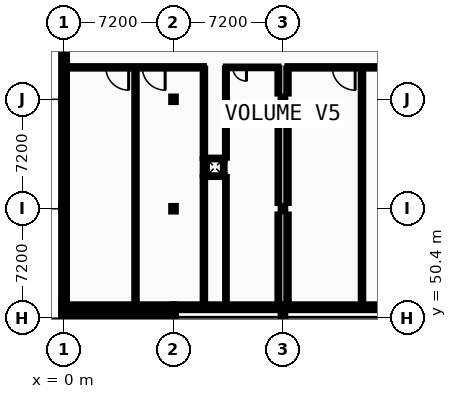
"""IFC4 building model, lengths in metres.
Left out: names, types, materials, properties, quantities, classifications, styles, units other than length and angle.
Written with IfcOpenShell. Run it as: python <this file> out.ifc"""

import sys

from ifc_helpers import new_model, si_unit, direction, frame, frame_2d, origin, origin_2d, place, context, subcontext, project, spatial, rectangle, i_section, extrude, element, fill, save


model = new_model("IFC4")
c1 = context("Model", 3, precision=1e-05, world=origin(), true_north=direction((0.0, 1.0)))
c2 = subcontext(c1, "Body", "Model", "MODEL_VIEW")
j1 = project(units=[si_unit("LENGTHUNIT", "METRE"), si_unit("PLANEANGLEUNIT", "RADIAN")], contexts=[c1])
p1 = place(None, origin())
s1 = spatial("IfcSite", under=j1, at=p1, CompositionType="ELEMENT")
p2 = place(p1, origin())
s2 = spatial("IfcBuilding", under=s1, at=p2, CompositionType="ELEMENT")
p3 = place(p2, frame((0.0, 0.0, 5.2)))
s3 = spatial("IfcBuildingStorey", under=s2, at=p3, CompositionType="ELEMENT", Elevation=5.2)
p4 = place(p3, frame((0.0, 50.4, 0.0), z_axis=(0.0, 0.0, 1.0), x_axis=(1.0, 0.0, 0.0)))
e1 = element("IfcColumn", 1, at=p4, inside=s3, PredefinedType="COLUMN", context=c2, shape_type="SweptSolid", body=[
    extrude(i_section(OverallWidth=0.3, OverallDepth=0.4, WebThickness=0.013, FlangeThickness=0.024, FilletRadius=0.027, at=origin_2d()), origin(), (0.0, 0.0, 1.0), 4.4),
])
p5 = place(p3, frame((0.0, 51.12, 0.0), z_axis=(0.0, 0.0, 1.0), x_axis=(1.0, 0.0, 0.0)))
e2 = element("IfcColumn", 2, at=p5, inside=s3, PredefinedType="COLUMN", context=c2, shape_type="SweptSolid", body=[
    extrude(i_section(OverallWidth=0.3, OverallDepth=0.32, WebThickness=0.011, FlangeThickness=0.021, FilletRadius=0.027, at=origin_2d()), origin(), (0.0, 0.0, 1.0), 4.4),
])
for number, where, z_axis, x_axis in (
    (3, (0.0, 57.6, 0.0), (0.0, 0.0, 1.0), (1.0, 0.0, 0.0)),
    (4, (0.0, 64.8, 0.0), (0.0, 0.0, 1.0), (1.0, 0.0, 0.0)),
):
    element("IfcColumn", number, at=place(p3, frame(where, z_axis=z_axis, x_axis=x_axis)), inside=s3, PredefinedType="COLUMN", context=c2, shape_type="SweptSolid", body=[
        extrude(i_section(OverallWidth=0.3, OverallDepth=0.36, WebThickness=0.012, FlangeThickness=0.022, FilletRadius=0.027, at=origin_2d()), origin(), (0.0, 0.0, 1.0), 4.4),
    ])
p6 = place(p3, frame((7.2, 50.4, 0.0), z_axis=(0.0, 0.0, 1.0), x_axis=(1.0, 0.0, 0.0)))
e5 = element("IfcColumn", 5, at=p6, inside=s3, PredefinedType="COLUMN", context=c2, shape_type="SweptSolid", body=[
    extrude(i_section(OverallWidth=0.3, OverallDepth=0.4, WebThickness=0.013, FlangeThickness=0.024, FilletRadius=0.027, at=origin_2d()), origin(), (0.0, 0.0, 1.0), 4.4),
])
p7 = place(p3, frame((7.2, 51.12, 0.0), z_axis=(0.0, 0.0, 1.0), x_axis=(1.0, 0.0, 0.0)))
e6 = element("IfcColumn", 6, at=p7, inside=s3, PredefinedType="COLUMN", context=c2, shape_type="SweptSolid", body=[
    extrude(i_section(OverallWidth=0.3, OverallDepth=0.32, WebThickness=0.011, FlangeThickness=0.021, FilletRadius=0.027, at=origin_2d()), origin(), (0.0, 0.0, 1.0), 4.4),
])
for number, where, z_axis, x_axis in (
    (7, (7.2, 57.6, 0.0), (0.0, 0.0, 1.0), (1.0, 0.0, 0.0)),
    (8, (7.2, 64.8, 0.0), (0.0, 0.0, 1.0), (1.0, 0.0, 0.0)),
):
    element("IfcColumn", number, at=place(p3, frame(where, z_axis=z_axis, x_axis=x_axis)), inside=s3, PredefinedType="COLUMN", context=c2, shape_type="SweptSolid", body=[
        extrude(i_section(OverallWidth=0.3, OverallDepth=0.36, WebThickness=0.012, FlangeThickness=0.022, FilletRadius=0.027, at=origin_2d()), origin(), (0.0, 0.0, 1.0), 4.4),
    ])
p8 = place(p3, frame((14.4, 50.4, 0.0), z_axis=(0.0, 0.0, 1.0), x_axis=(1.0, 0.0, 0.0)))
e9 = element("IfcColumn", 9, at=p8, inside=s3, PredefinedType="COLUMN", context=c2, shape_type="SweptSolid", body=[
    extrude(i_section(OverallWidth=0.3, OverallDepth=0.4, WebThickness=0.013, FlangeThickness=0.024, FilletRadius=0.027, at=origin_2d()), origin(), (0.0, 0.0, 1.0), 4.4),
])
p9 = place(p3, frame((14.4, 51.12, 0.0), z_axis=(0.0, 0.0, 1.0), x_axis=(1.0, 0.0, 0.0)))
e10 = element("IfcColumn", 10, at=p9, inside=s3, PredefinedType="COLUMN", context=c2, shape_type="SweptSolid", body=[
    extrude(i_section(OverallWidth=0.3, OverallDepth=0.32, WebThickness=0.011, FlangeThickness=0.021, FilletRadius=0.027, at=origin_2d()), origin(), (0.0, 0.0, 1.0), 4.4),
])
for number, where, z_axis, x_axis in (
    (11, (14.4, 57.6, 0.0), (0.0, 0.0, 1.0), (1.0, 0.0, 0.0)),
    (12, (14.4, 64.8, 0.0), (0.0, 0.0, 1.0), (1.0, 0.0, 0.0)),
):
    element("IfcColumn", number, at=place(p3, frame(where, z_axis=z_axis, x_axis=x_axis)), inside=s3, PredefinedType="COLUMN", context=c2, shape_type="SweptSolid", body=[
        extrude(i_section(OverallWidth=0.3, OverallDepth=0.36, WebThickness=0.012, FlangeThickness=0.022, FilletRadius=0.027, at=origin_2d()), origin(), (0.0, 0.0, 1.0), 4.4),
    ])
p10 = place(p3, frame((7.31, 50.4, 0.0), z_axis=(0.0, 0.0, 1.0), x_axis=(-1.0, 0.0, 0.0)))
e13 = element("IfcWall", 13, at=p10, inside=s3, PredefinedType="STANDARD", context=c2, shape_type="SweptSolid", body=[
    extrude(rectangle(XDim=7.5, YDim=0.38, at=frame_2d((3.75, 0.0))), origin(), (0.0, 0.0, 1.0), 3.88),
])
p11 = place(p10, frame((1.667, 0.0, 0.95)))
e14 = element("IfcOpeningElement", 14, at=p11, cuts=e13, PredefinedType="OPENING", context=c2, shape_type="SweptSolid", body=[
    extrude(rectangle(XDim=1.166, YDim=1.26, at=frame_2d((0.583, 0.63))), frame((0.0, 0.2, 0.0), z_axis=(0.0, -1.0, 0.0), x_axis=(1.0, 0.0, 0.0)), (0.0, 0.0, 1.0), 0.4),
])
p12 = place(p10, frame((4.667, 0.0, 0.95)))
e15 = element("IfcOpeningElement", 15, at=p12, cuts=e13, PredefinedType="OPENING", context=c2, shape_type="SweptSolid", body=[
    extrude(rectangle(XDim=1.166, YDim=1.26, at=frame_2d((0.583, 0.63))), frame((0.0, 0.2, 0.0), z_axis=(0.0, -1.0, 0.0), x_axis=(1.0, 0.0, 0.0)), (0.0, 0.0, 1.0), 0.4),
])
p13 = place(p3, frame((-0.19, 51.12, 0.0), z_axis=(0.0, 0.0, 1.0), x_axis=(1.0, 0.0, 0.0)))
e16 = element("IfcWall", 16, at=p13, inside=s3, PredefinedType="STANDARD", context=c2, shape_type="SweptSolid", body=[
    extrude(rectangle(XDim=7.39, YDim=0.38, at=frame_2d((3.695, 0.0))), origin(), (0.0, 0.0, 1.0), 3.88),
])
p14 = place(p13, frame((1.317, 0.0, 0.9)))
e17 = element("IfcOpeningElement", 17, at=p14, cuts=e16, PredefinedType="OPENING", context=c2, shape_type="SweptSolid", body=[
    extrude(rectangle(XDim=1.8, YDim=1.8, at=frame_2d((0.9, 0.9))), frame((0.0, 0.2, 0.0), z_axis=(0.0, -1.0, 0.0), x_axis=(1.0, 0.0, 0.0)), (0.0, 0.0, 1.0), 0.4),
])
p15 = place(p3, frame((7.2, 51.12, 0.0), z_axis=(0.0, 0.0, 1.0), x_axis=(1.0, 0.0, 0.0)))
e18 = element("IfcWall", 18, at=p15, inside=s3, PredefinedType="STANDARD", context=c2, shape_type="SweptSolid", body=[
    extrude(rectangle(XDim=7.2, YDim=0.38, at=frame_2d((3.6, 0.0))), origin(), (0.0, 0.0, 1.0), 3.88),
])
p16 = place(p3, frame((14.4, 51.12, 0.0), z_axis=(0.0, 0.0, 1.0), x_axis=(1.0, 0.0, 0.0)))
e19 = element("IfcWall", 19, at=p16, inside=s3, PredefinedType="STANDARD", context=c2, shape_type="SweptSolid", body=[
    extrude(rectangle(XDim=7.2, YDim=0.38, at=frame_2d((3.6, 0.0))), origin(), (0.0, 0.0, 1.0), 3.88),
])
p17 = place(p16, frame((1.56, 0.0, 0.9)))
e20 = element("IfcOpeningElement", 20, at=p17, cuts=e19, PredefinedType="OPENING", context=c2, shape_type="SweptSolid", body=[
    extrude(rectangle(XDim=1.2, YDim=1.8, at=frame_2d((0.6, 0.9))), frame((0.0, 0.2, 0.0), z_axis=(0.0, -1.0, 0.0), x_axis=(1.0, 0.0, 0.0)), (0.0, 0.0, 1.0), 0.4),
])
p18 = place(p3, frame((0.0, 57.6, 0.0), z_axis=(0.0, 0.0, 1.0), x_axis=(0.0, -1.0, 0.0)))
e21 = element("IfcWall", 21, at=p18, inside=s3, PredefinedType="STANDARD", context=c2, shape_type="SweptSolid", body=[
    extrude(rectangle(XDim=6.29, YDim=0.38, at=frame_2d((3.145, 0.0))), origin(), (0.0, 0.0, 1.0), 3.81),
])
p19 = place(p18, frame((2.698, 0.0, 0.95)))
e22 = element("IfcOpeningElement", 22, at=p19, cuts=e21, PredefinedType="OPENING", context=c2, shape_type="SweptSolid", body=[
    extrude(rectangle(XDim=0.894, YDim=1.26, at=frame_2d((0.447, 0.63))), frame((0.0, 0.2, 0.0), z_axis=(0.0, -1.0, 0.0), x_axis=(1.0, 0.0, 0.0)), (0.0, 0.0, 1.0), 0.4),
])
p20 = place(p3, frame((0.0, 64.8, 0.0), z_axis=(0.0, 0.0, 1.0), x_axis=(0.0, -1.0, 0.0)))
e23 = element("IfcWall", 23, at=p20, inside=s3, PredefinedType="STANDARD", context=c2, shape_type="SweptSolid", body=[
    extrude(rectangle(XDim=7.2, YDim=0.38, at=frame_2d((3.6, 0.0))), origin(), (0.0, 0.0, 1.0), 3.81),
])
p21 = place(p20, frame((1.696, 0.0, 0.95)))
e24 = element("IfcOpeningElement", 24, at=p21, cuts=e23, PredefinedType="OPENING", context=c2, shape_type="SweptSolid", body=[
    extrude(rectangle(XDim=0.928, YDim=1.26, at=frame_2d((0.464, 0.63))), frame((0.0, 0.2, 0.0), z_axis=(0.0, -1.0, 0.0), x_axis=(1.0, 0.0, 0.0)), (0.0, 0.0, 1.0), 0.4),
])
p22 = place(p20, frame((4.576, 0.0, 0.95)))
e25 = element("IfcOpeningElement", 25, at=p22, cuts=e23, PredefinedType="OPENING", context=c2, shape_type="SweptSolid", body=[
    extrude(rectangle(XDim=0.928, YDim=1.26, at=frame_2d((0.464, 0.63))), frame((0.0, 0.2, 0.0), z_axis=(0.0, -1.0, 0.0), x_axis=(1.0, 0.0, 0.0)), (0.0, 0.0, 1.0), 0.4),
])
p23 = place(p3, frame((0.0, 72.0, 0.0), z_axis=(0.0, 0.0, 1.0), x_axis=(0.0, -1.0, 0.0)))
e26 = element("IfcWall", 26, at=p23, inside=s3, PredefinedType="STANDARD", context=c2, shape_type="SweptSolid", body=[
    extrude(rectangle(XDim=7.2, YDim=0.38, at=frame_2d((3.6, 0.0))), origin(), (0.0, 0.0, 1.0), 3.81),
])
for number, where, z_axis, x_axis in (
    (27, (9.29, 59.745, 0.0), (0.0, 0.0, 1.0), (1.0, 0.0, 0.0)),
    (28, (9.29, 60.905, 0.0), (0.0, 0.0, 1.0), (1.0, 0.0, 0.0)),
):
    element("IfcWall", number, at=place(p3, frame(where, z_axis=z_axis, x_axis=x_axis)), inside=s3, PredefinedType="PARTITIONING", context=c2, shape_type="SweptSolid", body=[
        extrude(rectangle(XDim=1.27, YDim=0.11, at=frame_2d((0.635, 0.0))), origin(), (0.0, 0.0, 1.0), 4.185),
    ])
for number, where, z_axis, x_axis in (
    (29, (9.345, 59.8, 0.0), (0.0, 0.0, 1.0), (0.0, 1.0, 0.0)),
    (30, (10.505, 59.8, 0.0), (0.0, 0.0, 1.0), (0.0, 1.0, 0.0)),
):
    element("IfcWall", number, at=place(p3, frame(where, z_axis=z_axis, x_axis=x_axis)), inside=s3, PredefinedType="PARTITIONING", context=c2, shape_type="SweptSolid", body=[
        extrude(rectangle(XDim=1.05, YDim=0.11, at=frame_2d((0.525, 0.0))), origin(), (0.0, 0.0, 1.0), 4.185),
    ])
p24 = place(p3, frame((0.2, 66.9, 0.0), z_axis=(0.0, 0.0, 1.0), x_axis=(1.0, 0.0, 0.0)))
e31 = element("IfcWall", 31, at=p24, inside=s3, PredefinedType="PARTITIONING", context=c2, shape_type="SweptSolid", body=[
    extrude(rectangle(XDim=9.0, YDim=0.158, at=frame_2d((4.5, 0.0))), origin(), (0.0, 0.0, 1.0), 4.185),
])
p25 = place(p24, frame((4.95, 0.0, 0.0)))
e32 = element("IfcOpeningElement", 32, at=p25, cuts=e31, PredefinedType="OPENING", context=c2, shape_type="SweptSolid", body=[
    extrude(rectangle(XDim=1.5, YDim=2.2, at=frame_2d((0.75, 1.1))), frame((0.0, 0.089, 0.0), z_axis=(0.0, -1.0, 0.0), x_axis=(1.0, 0.0, 0.0)), (0.0, 0.0, 1.0), 0.178),
])
p26 = place(p24, frame((2.55, 0.0, 0.0)))
e33 = element("IfcOpeningElement", 33, at=p26, cuts=e31, PredefinedType="OPENING", context=c2, shape_type="SweptSolid", body=[
    extrude(rectangle(XDim=1.5, YDim=2.2, at=frame_2d((0.75, 1.1))), frame((0.0, 0.089, 0.0), z_axis=(0.0, -1.0, 0.0), x_axis=(1.0, 0.0, 0.0)), (0.0, 0.0, 1.0), 0.178),
])
p27 = place(p3, frame((10.65, 66.9, 0.0), z_axis=(0.0, 0.0, 1.0), x_axis=(1.0, 0.0, 0.0)))
e34 = element("IfcWall", 34, at=p27, inside=s3, PredefinedType="PARTITIONING", context=c2, shape_type="SweptSolid", body=[
    extrude(rectangle(XDim=3.45, YDim=0.11, at=frame_2d((1.725, 0.0))), origin(), (0.0, 0.0, 1.0), 4.185),
])
p28 = place(p27, frame((0.45, 0.0, 0.0)))
e35 = element("IfcOpeningElement", 35, at=p28, cuts=e34, PredefinedType="OPENING", context=c2, shape_type="SweptSolid", body=[
    extrude(rectangle(XDim=0.9, YDim=2.1, at=frame_2d((0.45, 1.05))), frame((0.0, 0.065, 0.0), z_axis=(0.0, -1.0, 0.0), x_axis=(1.0, 0.0, 0.0)), (0.0, 0.0, 1.0), 0.13),
])
p29 = place(p3, frame((14.7, 66.9, 0.0), z_axis=(0.0, 0.0, 1.0), x_axis=(1.0, 0.0, 0.0)))
e36 = element("IfcWall", 36, at=p29, inside=s3, PredefinedType="PARTITIONING", context=c2, shape_type="SweptSolid", body=[
    extrude(rectangle(XDim=13.9, YDim=0.158, at=frame_2d((6.95, 0.0))), origin(), (0.0, 0.0, 1.0), 4.185),
])
p30 = place(p29, frame((2.95, 0.0, 0.0)))
e37 = element("IfcOpeningElement", 37, at=p30, cuts=e36, PredefinedType="OPENING", context=c2, shape_type="SweptSolid", body=[
    extrude(rectangle(XDim=1.5, YDim=2.2, at=frame_2d((0.75, 1.1))), frame((0.0, 0.089, 0.0), z_axis=(0.0, -1.0, 0.0), x_axis=(1.0, 0.0, 0.0)), (0.0, 0.0, 1.0), 0.178),
])
p31 = place(p29, frame((8.843, 0.0, 0.0)))
e38 = element("IfcOpeningElement", 38, at=p31, cuts=e36, PredefinedType="OPENING", context=c2, shape_type="SweptSolid", body=[
    extrude(rectangle(XDim=1.114, YDim=2.124, at=frame_2d((0.557, 1.062))), frame((0.0, 0.089, 0.0), z_axis=(0.0, -1.0, 0.0), x_axis=(1.0, 0.0, 0.0)), (0.0, 0.0, 1.0), 0.178),
])
p32 = place(p3, frame((4.7, 51.32, 0.0), z_axis=(0.0, 0.0, 1.0), x_axis=(0.0, 1.0, 0.0)))
e39 = element("IfcWall", 39, at=p32, inside=s3, PredefinedType="PARTITIONING", context=c2, shape_type="SweptSolid", body=[
    extrude(rectangle(XDim=15.501, YDim=0.158, at=frame_2d((7.75, 0.0))), origin(), (0.0, 0.0, 1.0), 3.9),
])
p33 = place(p3, frame((9.2, 51.32, 0.0), z_axis=(0.0, 0.0, 1.0), x_axis=(0.0, 1.0, 0.0)))
e40 = element("IfcWall", 40, at=p33, inside=s3, PredefinedType="PARTITIONING", context=c2, shape_type="SweptSolid", body=[
    extrude(rectangle(XDim=8.37, YDim=0.158, at=frame_2d((4.185, 0.0))), origin(), (0.0, 0.0, 1.0), 4.185),
])
p34 = place(p3, frame((9.2, 59.8, 0.0), z_axis=(0.0, 0.0, 1.0), x_axis=(0.0, 1.0, 0.0)))
e41 = element("IfcWall", 41, at=p34, inside=s3, PredefinedType="PARTITIONING", context=c2, shape_type="SweptSolid", body=[
    extrude(rectangle(XDim=1.05, YDim=0.158, at=frame_2d((0.525, 0.0))), origin(), (0.0, 0.0, 1.0), 4.185),
])
p35 = place(p3, frame((9.2, 60.96, 0.0), z_axis=(0.0, 0.0, 1.0), x_axis=(0.0, 1.0, 0.0)))
e42 = element("IfcWall", 42, at=p35, inside=s3, PredefinedType="PARTITIONING", context=c2, shape_type="SweptSolid", body=[
    extrude(rectangle(XDim=5.861, YDim=0.158, at=frame_2d((2.931, 0.0))), origin(), (0.0, 0.0, 1.0), 4.185),
])
p36 = place(p3, frame((10.65, 51.32, 0.0), z_axis=(0.0, 0.0, 1.0), x_axis=(0.0, 1.0, 0.0)))
e43 = element("IfcWall", 43, at=p36, inside=s3, PredefinedType="PARTITIONING", context=c2, shape_type="SweptSolid", body=[
    extrude(rectangle(XDim=8.37, YDim=0.11, at=frame_2d((4.185, 0.0))), origin(), (0.0, 0.0, 1.0), 4.185),
])
p37 = place(p3, frame((10.65, 60.96, 0.0), z_axis=(0.0, 0.0, 1.0), x_axis=(0.0, 1.0, 0.0)))
e44 = element("IfcWall", 44, at=p37, inside=s3, PredefinedType="PARTITIONING", context=c2, shape_type="SweptSolid", body=[
    extrude(rectangle(XDim=5.885, YDim=0.125, at=frame_2d((2.942, 0.0))), origin(), (0.0, 0.0, 1.0), 4.185),
])
p38 = place(p3, frame((14.1, 51.5, 0.0), z_axis=(0.0, 0.0, 1.0), x_axis=(0.0, 1.0, 0.0)))
e45 = element("IfcWall", 45, at=p38, inside=s3, PredefinedType="PARTITIONING", context=c2, shape_type="SweptSolid", body=[
    extrude(rectangle(XDim=5.72, YDim=0.125, at=frame_2d((2.86, 0.0))), origin(), (0.0, 0.0, 1.0), 4.185),
])
p39 = place(p3, frame((14.1, 57.98, 0.0), z_axis=(0.0, 0.0, 1.0), x_axis=(0.0, 1.0, 0.0)))
e46 = element("IfcWall", 46, at=p39, inside=s3, PredefinedType="PARTITIONING", context=c2, shape_type="SweptSolid", body=[
    extrude(rectangle(XDim=6.44, YDim=0.11, at=frame_2d((3.22, 0.0))), origin(), (0.0, 0.0, 1.0), 4.185),
])
p40 = place(p3, frame((14.1, 65.18, 0.0), z_axis=(0.0, 0.0, 1.0), x_axis=(0.0, 1.0, 0.0)))
e47 = element("IfcWall", 47, at=p40, inside=s3, PredefinedType="PARTITIONING", context=c2, shape_type="SweptSolid", body=[
    extrude(rectangle(XDim=1.665, YDim=0.125, at=frame_2d((0.833, 0.0))), origin(), (0.0, 0.0, 1.0), 4.185),
])
p41 = place(p3, frame((14.7, 51.5, 0.0), z_axis=(0.0, 0.0, 1.0), x_axis=(0.0, 1.0, 0.0)))
e48 = element("IfcWall", 48, at=p41, inside=s3, PredefinedType="PARTITIONING", context=c2, shape_type="SweptSolid", body=[
    extrude(rectangle(XDim=5.72, YDim=0.158, at=frame_2d((2.86, 0.0))), origin(), (0.0, 0.0, 1.0), 3.88),
])
p42 = place(p3, frame((14.7, 57.98, 0.0), z_axis=(0.0, 0.0, 1.0), x_axis=(0.0, 1.0, 0.0)))
e49 = element("IfcWall", 49, at=p42, inside=s3, PredefinedType="PARTITIONING", context=c2, shape_type="SweptSolid", body=[
    extrude(rectangle(XDim=6.44, YDim=0.158, at=frame_2d((3.22, 0.0))), origin(), (0.0, 0.0, 1.0), 3.88),
])
p43 = place(p3, frame((14.7, 65.18, 0.0), z_axis=(0.0, 0.0, 1.0), x_axis=(0.0, 1.0, 0.0)))
e50 = element("IfcWall", 50, at=p43, inside=s3, PredefinedType="PARTITIONING", context=c2, shape_type="SweptSolid", body=[
    extrude(rectangle(XDim=1.641, YDim=0.158, at=frame_2d((0.821, 0.0))), origin(), (0.0, 0.0, 1.0), 3.88),
])
p44 = place(p3, frame((19.6, 51.32, 0.0), z_axis=(0.0, 0.0, 1.0), x_axis=(0.0, 1.0, 0.0)))
e51 = element("IfcWall", 51, at=p44, inside=s3, PredefinedType="PARTITIONING", context=c2, shape_type="SweptSolid", body=[
    extrude(rectangle(XDim=15.501, YDim=0.158, at=frame_2d((7.75, 0.0))), origin(), (0.0, 0.0, 1.0), 4.185),
])
p45 = place(p11, origin())
e52 = element("IfcWindow", 52, at=p45, inside=s3, PartitioningType="SINGLE_PANEL", PredefinedType="WINDOW", context=c2, shape_type="SweptSolid", body=[
    extrude(rectangle(XDim=1.166, YDim=1.26, at=frame_2d((0.583, 0.63))), frame((0.0, 0.03, 0.0), z_axis=(0.0, -1.0, 0.0), x_axis=(1.0, 0.0, 0.0)), (0.0, 0.0, 1.0), 0.06),
])
fill(e14, e52)
p46 = place(p12, origin())
e53 = element("IfcWindow", 53, at=p46, inside=s3, PartitioningType="SINGLE_PANEL", PredefinedType="WINDOW", context=c2, shape_type="SweptSolid", body=[
    extrude(rectangle(XDim=1.166, YDim=1.26, at=frame_2d((0.583, 0.63))), frame((0.0, 0.03, 0.0), z_axis=(0.0, -1.0, 0.0), x_axis=(1.0, 0.0, 0.0)), (0.0, 0.0, 1.0), 0.06),
])
fill(e15, e53)
p47 = place(p14, origin())
e54 = element("IfcWindow", 54, at=p47, inside=s3, PartitioningType="SINGLE_PANEL", PredefinedType="WINDOW", context=c2, shape_type="SweptSolid", body=[
    extrude(rectangle(XDim=1.8, YDim=1.8, at=frame_2d((0.9, 0.9))), frame((0.0, 0.03, 0.0), z_axis=(0.0, -1.0, 0.0), x_axis=(1.0, 0.0, 0.0)), (0.0, 0.0, 1.0), 0.06),
])
fill(e17, e54)
p48 = place(p17, origin())
e55 = element("IfcWindow", 55, at=p48, inside=s3, PartitioningType="SINGLE_PANEL", PredefinedType="WINDOW", context=c2, shape_type="SweptSolid", body=[
    extrude(rectangle(XDim=1.2, YDim=1.8, at=frame_2d((0.6, 0.9))), frame((0.0, 0.03, 0.0), z_axis=(0.0, -1.0, 0.0), x_axis=(1.0, 0.0, 0.0)), (0.0, 0.0, 1.0), 0.06),
])
fill(e20, e55)
p49 = place(p19, origin())
e56 = element("IfcWindow", 56, at=p49, inside=s3, PartitioningType="SINGLE_PANEL", PredefinedType="WINDOW", context=c2, shape_type="SweptSolid", body=[
    extrude(rectangle(XDim=0.894, YDim=1.26, at=frame_2d((0.447, 0.63))), frame((0.0, 0.03, 0.0), z_axis=(0.0, -1.0, 0.0), x_axis=(1.0, 0.0, 0.0)), (0.0, 0.0, 1.0), 0.06),
])
fill(e22, e56)
p50 = place(p21, origin())
e57 = element("IfcWindow", 57, at=p50, inside=s3, PartitioningType="SINGLE_PANEL", PredefinedType="WINDOW", context=c2, shape_type="SweptSolid", body=[
    extrude(rectangle(XDim=0.928, YDim=1.26, at=frame_2d((0.464, 0.63))), frame((0.0, 0.03, 0.0), z_axis=(0.0, -1.0, 0.0), x_axis=(1.0, 0.0, 0.0)), (0.0, 0.0, 1.0), 0.06),
])
fill(e24, e57)
p51 = place(p22, origin())
e58 = element("IfcWindow", 58, at=p51, inside=s3, PartitioningType="SINGLE_PANEL", PredefinedType="WINDOW", context=c2, shape_type="SweptSolid", body=[
    extrude(rectangle(XDim=0.928, YDim=1.26, at=frame_2d((0.464, 0.63))), frame((0.0, 0.03, 0.0), z_axis=(0.0, -1.0, 0.0), x_axis=(1.0, 0.0, 0.0)), (0.0, 0.0, 1.0), 0.06),
])
fill(e25, e58)
p52 = place(p28, origin())
e59 = element("IfcDoor", 59, at=p52, inside=s3, OperationType="SINGLE_SWING_RIGHT", PredefinedType="DOOR", context=c2, shape_type="SweptSolid", body=[
    extrude(rectangle(XDim=0.9, YDim=2.1, at=frame_2d((0.45, 1.05))), frame((0.0, 0.025, 0.0), z_axis=(0.0, -1.0, 0.0), x_axis=(1.0, 0.0, 0.0)), (0.0, 0.0, 1.0), 0.05),
])
fill(e35, e59)
p53 = place(p25, origin())
e60 = element("IfcDoor", 60, at=p53, inside=s3, OperationType="DOUBLE_DOOR_SINGLE_SWING", PredefinedType="DOOR", context=c2, shape_type="SweptSolid", body=[
    extrude(rectangle(XDim=1.5, YDim=2.2, at=frame_2d((0.75, 1.1))), frame((0.0, 0.025, 0.0), z_axis=(0.0, -1.0, 0.0), x_axis=(1.0, 0.0, 0.0)), (0.0, 0.0, 1.0), 0.05),
])
fill(e32, e60)
p54 = place(p26, origin())
e61 = element("IfcDoor", 61, at=p54, inside=s3, OperationType="DOUBLE_DOOR_SINGLE_SWING", PredefinedType="DOOR", context=c2, shape_type="SweptSolid", body=[
    extrude(rectangle(XDim=1.5, YDim=2.2, at=frame_2d((0.75, 1.1))), frame((0.0, 0.025, 0.0), z_axis=(0.0, -1.0, 0.0), x_axis=(1.0, 0.0, 0.0)), (0.0, 0.0, 1.0), 0.05),
])
fill(e33, e61)
p55 = place(p30, origin())
e62 = element("IfcDoor", 62, at=p55, inside=s3, OperationType="DOUBLE_DOOR_SINGLE_SWING", PredefinedType="DOOR", context=c2, shape_type="SweptSolid", body=[
    extrude(rectangle(XDim=1.5, YDim=2.2, at=frame_2d((0.75, 1.1))), frame((0.0, 0.025, 0.0), z_axis=(0.0, -1.0, 0.0), x_axis=(1.0, 0.0, 0.0)), (0.0, 0.0, 1.0), 0.05),
])
fill(e37, e62)
save(model, sys.argv[1])
